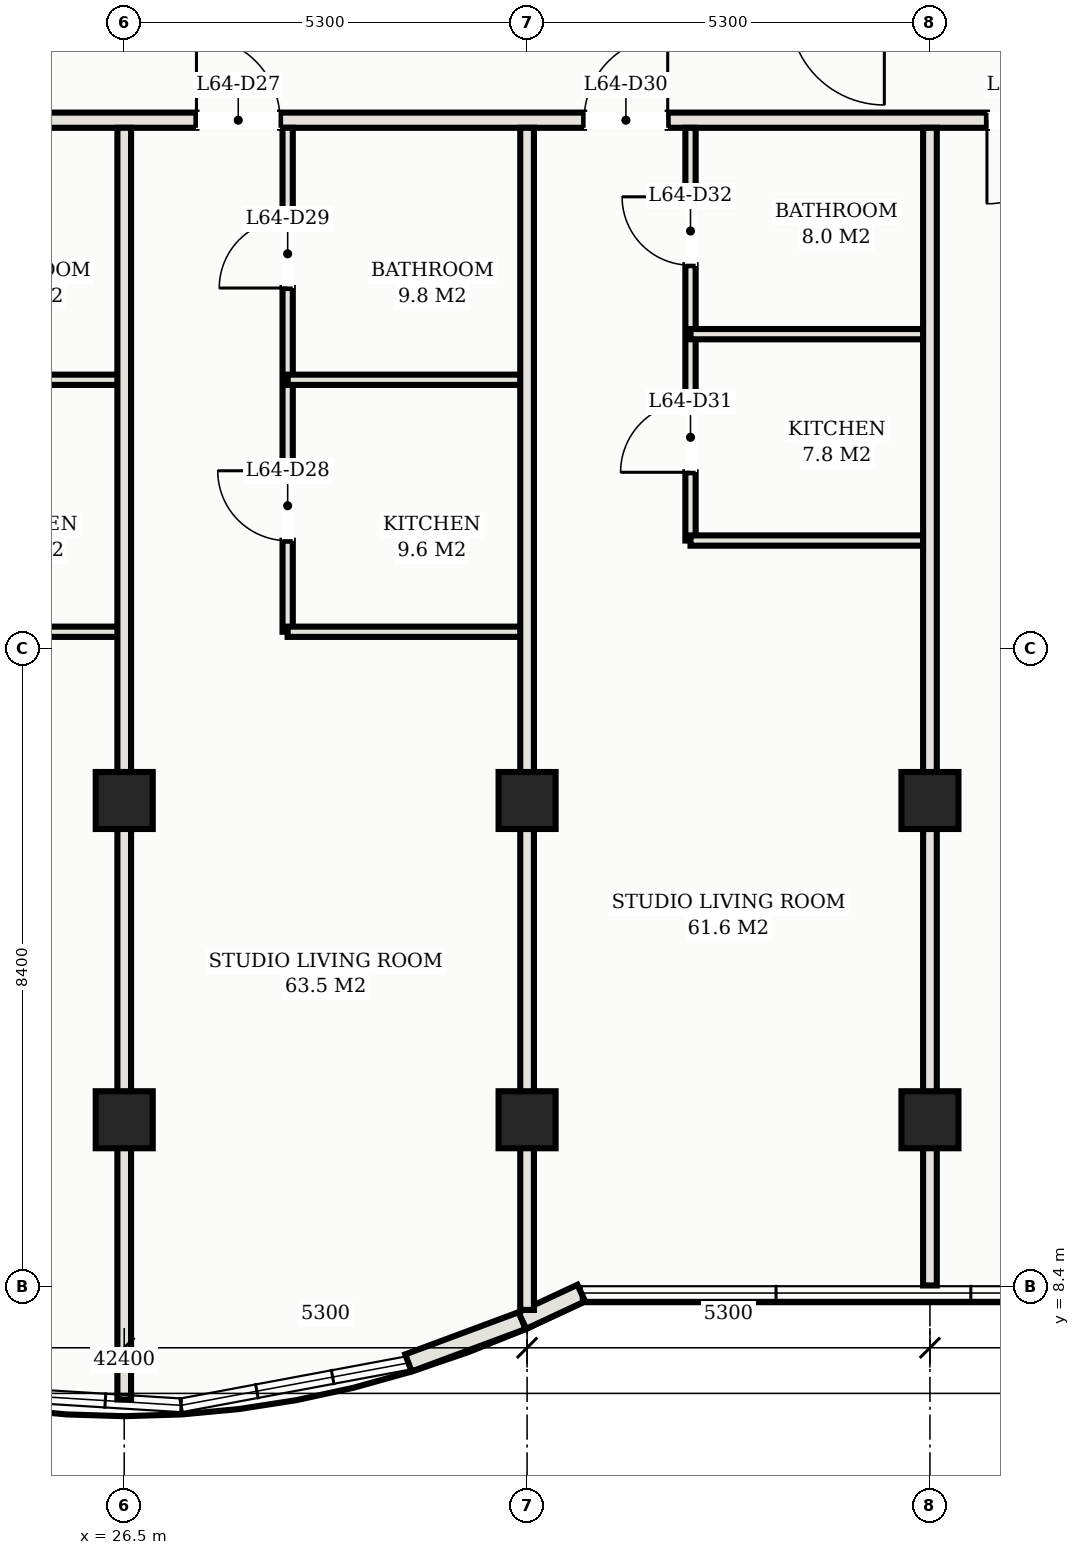
"""IFC4 building model, lengths in metres.
Left out: names, types, materials, properties, quantities, classifications, styles, units other than length and angle.
Written with IfcOpenShell. Run it as: python <this file> out.ifc"""

import sys

from ifc_helpers import new_model, si_unit, direction, frame, frame_2d, origin, origin_2d, place, context, subcontext, project, spatial, rectangle, hollow_rectangle, extrude, element, fill, save


model = new_model("IFC4")
c1 = context("Model", 3, precision=1e-05, world=origin(), true_north=direction((0.0, 1.0)))
c2 = subcontext(c1, "Body", "Model", "MODEL_VIEW")
j1 = project(units=[si_unit("LENGTHUNIT", "METRE"), si_unit("PLANEANGLEUNIT", "RADIAN")], contexts=[c1])
p1 = place(None, origin())
s1 = spatial("IfcSite", under=j1, at=p1, CompositionType="ELEMENT")
p2 = place(p1, origin())
s2 = spatial("IfcBuilding", under=s1, at=p2, CompositionType="ELEMENT")
p3 = place(p2, frame((0.0, 0.0, 233.0)))
s3 = spatial("IfcBuildingStorey", under=s2, at=p3, CompositionType="ELEMENT", Elevation=233.0)
for number, where, z_axis, x_axis in (
    (1, (26.5, 14.8, 0.0), (0.0, 0.0, 1.0), (1.0, 0.0, 0.0)),
    (2, (26.5, 10.6, 0.0), (0.0, 0.0, 1.0), (1.0, 0.0, 0.0)),
    (3, (31.8, 14.8, 0.0), (0.0, 0.0, 1.0), (1.0, 0.0, 0.0)),
    (4, (31.8, 10.6, 0.0), (0.0, 0.0, 1.0), (1.0, 0.0, 0.0)),
    (5, (37.1, 14.8, 0.0), (0.0, 0.0, 1.0), (1.0, 0.0, 0.0)),
    (6, (37.1, 10.6, 0.0), (0.0, 0.0, 1.0), (1.0, 0.0, 0.0)),
):
    element("IfcColumn", number, at=place(p3, frame(where, z_axis=z_axis, x_axis=x_axis)), inside=s3, PredefinedType="COLUMN", context=c2, shape_type="SweptSolid", body=[
        extrude(hollow_rectangle(XDim=0.75, YDim=0.75, WallThickness=0.025, at=origin_2d()), origin(), (0.0, 0.0, 1.0), 3.3),
    ])
p4 = place(p3, frame((30.239, 7.401, 0.0), z_axis=(0.0, 0.0, 1.0), x_axis=(0.937279890693, 0.34857769077, 0.0)))
e7 = element("IfcWall", 7, at=p4, inside=s3, PredefinedType="SOLIDWALL", context=c2, shape_type="SweptSolid", body=[
    extrude(rectangle(XDim=1.598, YDim=0.24, at=frame_2d((0.799, 0.0))), origin(), (0.0, 0.0, 1.0), 3.11),
])
p5 = place(p3, frame((31.737, 7.958, 0.0), z_axis=(0.0, 0.0, 1.0), x_axis=(0.906190424584, 0.422869855147, 0.0)))
e8 = element("IfcWall", 8, at=p5, inside=s3, PredefinedType="SOLIDWALL", context=c2, shape_type="SweptSolid", body=[
    extrude(rectangle(XDim=0.856, YDim=0.24, at=frame_2d((0.428, 0.0))), origin(), (0.0, 0.0, 1.0), 3.11),
])
p6 = place(p3, frame((8.6, 23.75, 0.0), z_axis=(0.0, 0.0, 1.0), x_axis=(1.0, 0.0, 0.0)))
e9 = element("IfcWall", 9, at=p6, inside=s3, PredefinedType="PARTITIONING", context=c2, shape_type="SweptSolid", body=[
    extrude(rectangle(XDim=35.8, YDim=0.2, at=frame_2d((17.9, 0.0))), origin(), (0.0, 0.0, 1.0), 2.45),
])
p7 = place(p6, frame((2.75, 0.0, 0.0)))
e10 = element("IfcOpeningElement", 10, at=p7, cuts=e9, PredefinedType="OPENING", context=c2, shape_type="SweptSolid", body=[
    extrude(rectangle(XDim=1.1, YDim=2.25, at=frame_2d((0.55, 1.125))), frame((0.0, 0.11, 0.0), z_axis=(0.0, -1.0, 0.0), x_axis=(1.0, 0.0, 0.0)), (0.0, 0.0, 1.0), 0.22),
])
p8 = place(p6, frame((8.05, 0.0, 0.0)))
e11 = element("IfcOpeningElement", 11, at=p8, cuts=e9, PredefinedType="OPENING", context=c2, shape_type="SweptSolid", body=[
    extrude(rectangle(XDim=1.1, YDim=2.25, at=frame_2d((0.55, 1.125))), frame((0.0, 0.11, 0.0), z_axis=(0.0, -1.0, 0.0), x_axis=(1.0, 0.0, 0.0)), (0.0, 0.0, 1.0), 0.22),
])
p9 = place(p6, frame((13.35, 0.0, 0.0)))
e12 = element("IfcOpeningElement", 12, at=p9, cuts=e9, PredefinedType="OPENING", context=c2, shape_type="SweptSolid", body=[
    extrude(rectangle(XDim=1.1, YDim=2.25, at=frame_2d((0.55, 1.125))), frame((0.0, 0.11, 0.0), z_axis=(0.0, -1.0, 0.0), x_axis=(1.0, 0.0, 0.0)), (0.0, 0.0, 1.0), 0.22),
])
p10 = place(p6, frame((18.85, 0.0, 0.0)))
e13 = element("IfcOpeningElement", 13, at=p10, cuts=e9, PredefinedType="OPENING", context=c2, shape_type="SweptSolid", body=[
    extrude(rectangle(XDim=1.1, YDim=2.25, at=frame_2d((0.55, 1.125))), frame((0.0, 0.11, 0.0), z_axis=(0.0, -1.0, 0.0), x_axis=(1.0, 0.0, 0.0)), (0.0, 0.0, 1.0), 0.22),
])
p11 = place(p6, frame((23.95, 0.0, 0.0)))
e14 = element("IfcOpeningElement", 14, at=p11, cuts=e9, PredefinedType="OPENING", context=c2, shape_type="SweptSolid", body=[
    extrude(rectangle(XDim=1.1, YDim=2.25, at=frame_2d((0.55, 1.125))), frame((0.0, 0.11, 0.0), z_axis=(0.0, -1.0, 0.0), x_axis=(1.0, 0.0, 0.0)), (0.0, 0.0, 1.0), 0.22),
])
p12 = place(p6, frame((29.25, 0.0, 0.0)))
e15 = element("IfcOpeningElement", 15, at=p12, cuts=e9, PredefinedType="OPENING", context=c2, shape_type="SweptSolid", body=[
    extrude(rectangle(XDim=1.1, YDim=2.25, at=frame_2d((0.55, 1.125))), frame((0.0, 0.11, 0.0), z_axis=(0.0, -1.0, 0.0), x_axis=(1.0, 0.0, 0.0)), (0.0, 0.0, 1.0), 0.22),
])
p13 = place(p6, frame((0.505, 0.0, 0.0)))
e16 = element("IfcOpeningElement", 16, at=p13, cuts=e9, PredefinedType="OPENING", context=c2, shape_type="SweptSolid", body=[
    extrude(rectangle(XDim=0.9, YDim=2.15, at=frame_2d((0.45, 1.075))), frame((0.0, 0.11, 0.0), z_axis=(0.0, -1.0, 0.0), x_axis=(1.0, 0.0, 0.0)), (0.0, 0.0, 1.0), 0.22),
])
p14 = place(p6, frame((34.395, 0.0, 0.0)))
e17 = element("IfcOpeningElement", 17, at=p14, cuts=e9, PredefinedType="OPENING", context=c2, shape_type="SweptSolid", body=[
    extrude(rectangle(XDim=0.9, YDim=2.15, at=frame_2d((0.45, 1.075))), frame((0.0, 0.11, 0.0), z_axis=(0.0, -1.0, 0.0), x_axis=(1.0, 0.0, 0.0)), (0.0, 0.0, 1.0), 0.22),
])
for number, where, z_axis, x_axis in (
    (18, (23.35, 17.02, 0.0), (0.0, 0.0, 1.0), (1.0, 0.0, 0.0)),
    (19, (23.35, 20.335, 0.0), (0.0, 0.0, 1.0), (1.0, 0.0, 0.0)),
):
    element("IfcWall", number, at=place(p3, frame(where, z_axis=z_axis, x_axis=x_axis)), inside=s3, PredefinedType="PARTITIONING", context=c2, shape_type="SweptSolid", body=[
        extrude(rectangle(XDim=3.15, YDim=0.135, at=frame_2d((1.575, 0.0))), origin(), (0.0, 0.0, 1.0), 2.45),
    ])
p15 = place(p3, frame((26.5, 6.92, 0.0), z_axis=(0.0, 0.0, 1.0), x_axis=(0.0, 1.0, 0.0)))
e20 = element("IfcWall", 20, at=p15, inside=s3, PredefinedType="PARTITIONING", context=c2, shape_type="SweptSolid", body=[
    extrude(rectangle(XDim=16.73, YDim=0.18, at=frame_2d((8.365, 0.0))), origin(), (0.0, 0.0, 1.0), 2.45),
])
p16 = place(p3, frame((28.65, 17.02, 0.0), z_axis=(0.0, 0.0, 1.0), x_axis=(0.0, 1.0, 0.0)))
e21 = element("IfcWall", 21, at=p16, inside=s3, PredefinedType="PARTITIONING", context=c2, shape_type="SweptSolid", body=[
    extrude(rectangle(XDim=6.63, YDim=0.135, at=frame_2d((3.315, 0.0))), origin(), (0.0, 0.0, 1.0), 2.45),
])
p17 = place(p16, frame((1.198, 0.0, 0.0)))
e22 = element("IfcOpeningElement", 22, at=p17, cuts=e21, PredefinedType="OPENING", context=c2, shape_type="SweptSolid", body=[
    extrude(rectangle(XDim=0.92, YDim=2.15, at=frame_2d((0.46, 1.075))), frame((0.0, 0.078, 0.0), z_axis=(0.0, -1.0, 0.0), x_axis=(1.0, 0.0, 0.0)), (0.0, 0.0, 1.0), 0.155),
])
p18 = place(p16, frame((4.522, 0.0, 0.0)))
e23 = element("IfcOpeningElement", 23, at=p18, cuts=e21, PredefinedType="OPENING", context=c2, shape_type="SweptSolid", body=[
    extrude(rectangle(XDim=0.9, YDim=2.15, at=frame_2d((0.45, 1.075))), frame((0.0, 0.078, 0.0), z_axis=(0.0, -1.0, 0.0), x_axis=(1.0, 0.0, 0.0)), (0.0, 0.0, 1.0), 0.155),
])
for number, where, z_axis, x_axis in (
    (24, (28.65, 17.02, 0.0), (0.0, 0.0, 1.0), (1.0, 0.0, 0.0)),
    (25, (28.65, 20.335, 0.0), (0.0, 0.0, 1.0), (1.0, 0.0, 0.0)),
):
    element("IfcWall", number, at=place(p3, frame(where, z_axis=z_axis, x_axis=x_axis)), inside=s3, PredefinedType="PARTITIONING", context=c2, shape_type="SweptSolid", body=[
        extrude(rectangle(XDim=3.15, YDim=0.135, at=frame_2d((1.575, 0.0))), origin(), (0.0, 0.0, 1.0), 2.45),
    ])
p19 = place(p3, frame((31.8, 8.098, 0.0), z_axis=(0.0, 0.0, 1.0), x_axis=(0.0, 1.0, 0.0)))
e26 = element("IfcWall", 26, at=p19, inside=s3, PredefinedType="PARTITIONING", context=c2, shape_type="SweptSolid", body=[
    extrude(rectangle(XDim=15.552, YDim=0.18, at=frame_2d((7.776, 0.0))), origin(), (0.0, 0.0, 1.0), 2.45),
])
p20 = place(p3, frame((33.95, 18.22, 0.0), z_axis=(0.0, 0.0, 1.0), x_axis=(0.0, 1.0, 0.0)))
e27 = element("IfcWall", 27, at=p20, inside=s3, PredefinedType="PARTITIONING", context=c2, shape_type="SweptSolid", body=[
    extrude(rectangle(XDim=5.43, YDim=0.135, at=frame_2d((2.715, 0.0))), origin(), (0.0, 0.0, 1.0), 2.45),
])
p21 = place(p20, frame((0.898, 0.0, 0.0)))
e28 = element("IfcOpeningElement", 28, at=p21, cuts=e27, PredefinedType="OPENING", context=c2, shape_type="SweptSolid", body=[
    extrude(rectangle(XDim=0.92, YDim=2.15, at=frame_2d((0.46, 1.075))), frame((0.0, 0.078, 0.0), z_axis=(0.0, -1.0, 0.0), x_axis=(1.0, 0.0, 0.0)), (0.0, 0.0, 1.0), 0.155),
])
p22 = place(p20, frame((3.622, 0.0, 0.0)))
e29 = element("IfcOpeningElement", 29, at=p22, cuts=e27, PredefinedType="OPENING", context=c2, shape_type="SweptSolid", body=[
    extrude(rectangle(XDim=0.9, YDim=2.15, at=frame_2d((0.45, 1.075))), frame((0.0, 0.078, 0.0), z_axis=(0.0, -1.0, 0.0), x_axis=(1.0, 0.0, 0.0)), (0.0, 0.0, 1.0), 0.155),
])
for number, where, z_axis, x_axis in (
    (30, (33.95, 18.22, 0.0), (0.0, 0.0, 1.0), (1.0, 0.0, 0.0)),
    (31, (33.95, 20.935, 0.0), (0.0, 0.0, 1.0), (1.0, 0.0, 0.0)),
):
    element("IfcWall", number, at=place(p3, frame(where, z_axis=z_axis, x_axis=x_axis)), inside=s3, PredefinedType="PARTITIONING", context=c2, shape_type="SweptSolid", body=[
        extrude(rectangle(XDim=3.15, YDim=0.135, at=frame_2d((1.575, 0.0))), origin(), (0.0, 0.0, 1.0), 2.45),
    ])
p23 = place(p3, frame((37.1, 8.42, 0.0), z_axis=(0.0, 0.0, 1.0), x_axis=(0.0, 1.0, 0.0)))
e32 = element("IfcWall", 32, at=p23, inside=s3, PredefinedType="PARTITIONING", context=c2, shape_type="SweptSolid", body=[
    extrude(rectangle(XDim=15.23, YDim=0.18, at=frame_2d((7.615, 0.0))), origin(), (0.0, 0.0, 1.0), 2.45),
])
p24 = place(p10, origin())
e33 = element("IfcDoor", 33, at=p24, inside=s3, OperationType="SINGLE_SWING_LEFT", PredefinedType="DOOR", context=c2, shape_type="SweptSolid", body=[
    extrude(rectangle(XDim=1.1, YDim=2.25, at=frame_2d((0.55, 1.125))), frame((0.0, 0.025, 0.0), z_axis=(0.0, -1.0, 0.0), x_axis=(1.0, 0.0, 0.0)), (0.0, 0.0, 1.0), 0.05),
])
fill(e13, e33)
p25 = place(p17, origin())
e34 = element("IfcDoor", 34, at=p25, inside=s3, OperationType="SINGLE_SWING_RIGHT", PredefinedType="DOOR", context=c2, shape_type="SweptSolid", body=[
    extrude(rectangle(XDim=0.92, YDim=2.15, at=frame_2d((0.46, 1.075))), frame((0.0, 0.025, 0.0), z_axis=(0.0, -1.0, 0.0), x_axis=(1.0, 0.0, 0.0)), (0.0, 0.0, 1.0), 0.05),
])
fill(e22, e34)
p26 = place(p18, origin())
e35 = element("IfcDoor", 35, at=p26, inside=s3, OperationType="SINGLE_SWING_LEFT", PredefinedType="DOOR", context=c2, shape_type="SweptSolid", body=[
    extrude(rectangle(XDim=0.9, YDim=2.15, at=frame_2d((0.45, 1.075))), frame((0.0, 0.025, 0.0), z_axis=(0.0, -1.0, 0.0), x_axis=(1.0, 0.0, 0.0)), (0.0, 0.0, 1.0), 0.05),
])
fill(e23, e35)
p27 = place(p11, origin())
e36 = element("IfcDoor", 36, at=p27, inside=s3, OperationType="SINGLE_SWING_RIGHT", PredefinedType="DOOR", context=c2, shape_type="SweptSolid", body=[
    extrude(rectangle(XDim=1.1, YDim=2.25, at=frame_2d((0.55, 1.125))), frame((0.0, 0.025, 0.0), z_axis=(0.0, -1.0, 0.0), x_axis=(1.0, 0.0, 0.0)), (0.0, 0.0, 1.0), 0.05),
])
fill(e14, e36)
p28 = place(p21, origin())
e37 = element("IfcDoor", 37, at=p28, inside=s3, OperationType="SINGLE_SWING_LEFT", PredefinedType="DOOR", context=c2, shape_type="SweptSolid", body=[
    extrude(rectangle(XDim=0.92, YDim=2.15, at=frame_2d((0.46, 1.075))), frame((0.0, 0.025, 0.0), z_axis=(0.0, -1.0, 0.0), x_axis=(1.0, 0.0, 0.0)), (0.0, 0.0, 1.0), 0.05),
])
fill(e28, e37)
p29 = place(p22, origin())
e38 = element("IfcDoor", 38, at=p29, inside=s3, OperationType="SINGLE_SWING_RIGHT", PredefinedType="DOOR", context=c2, shape_type="SweptSolid", body=[
    extrude(rectangle(XDim=0.9, YDim=2.15, at=frame_2d((0.45, 1.075))), frame((0.0, 0.025, 0.0), z_axis=(0.0, -1.0, 0.0), x_axis=(1.0, 0.0, 0.0)), (0.0, 0.0, 1.0), 0.05),
])
fill(e29, e38)
p30 = place(p12, frame((1.1, 0.0, 0.0), z_axis=(0.0, 0.0, 1.0), x_axis=(-1.0, 0.0, 0.0)))
e39 = element("IfcDoor", 39, at=p30, inside=s3, OperationType="SINGLE_SWING_RIGHT", PredefinedType="DOOR", context=c2, shape_type="SweptSolid", body=[
    extrude(rectangle(XDim=1.1, YDim=2.25, at=frame_2d((0.55, 1.125))), frame((0.0, 0.025, 0.0), z_axis=(0.0, -1.0, 0.0), x_axis=(1.0, 0.0, 0.0)), (0.0, 0.0, 1.0), 0.05),
])
fill(e15, e39)
save(model, sys.argv[1])
